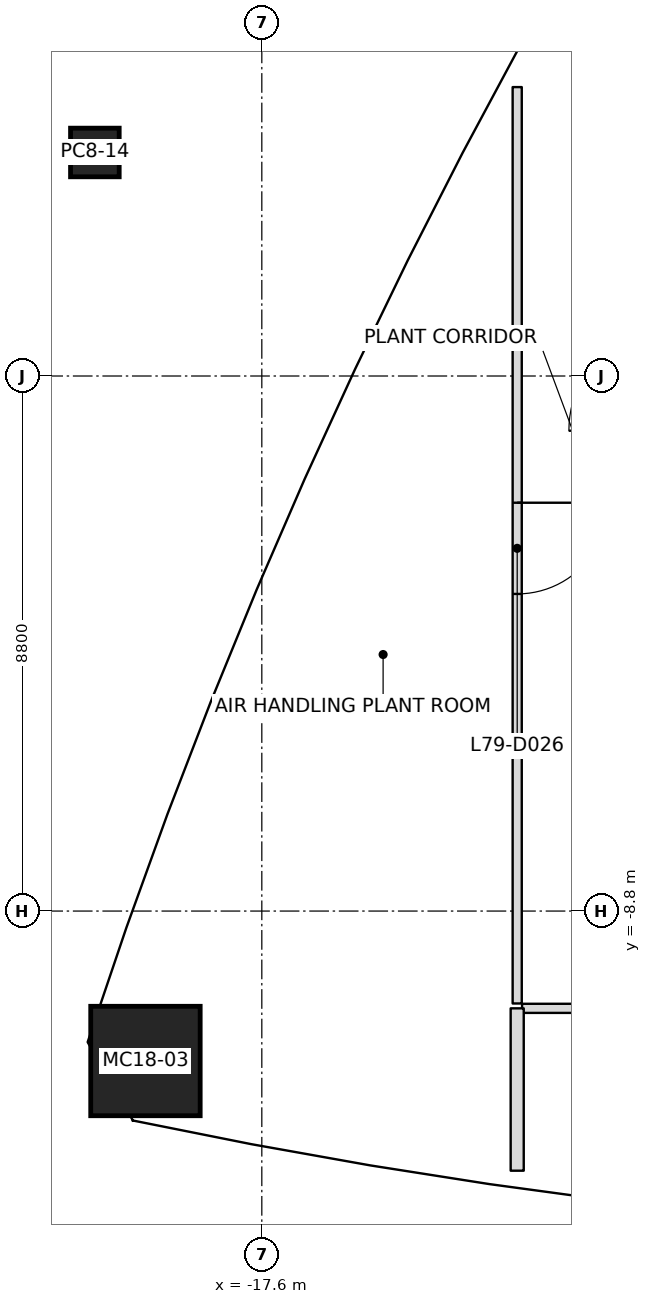
"""IFC4 building model, lengths in metres.
Left out: names, types, materials, properties, quantities, classifications, styles, units other than length and angle.
Written with IfcOpenShell. Run it as: python <this file> out.ifc"""

import sys

from ifc_helpers import new_model, si_unit, direction, frame, frame_2d, origin, origin_2d, place, context, subcontext, project, spatial, rectangle, extrude, element, fill, save


model = new_model("IFC4")
c1 = context("Model", 3, precision=1e-05, world=origin(), true_north=direction((0.0, 1.0)))
c2 = subcontext(c1, "Body", "Model", "MODEL_VIEW")
j1 = project(units=[si_unit("LENGTHUNIT", "METRE"), si_unit("PLANEANGLEUNIT", "RADIAN")], contexts=[c1])
p1 = place(None, origin())
s1 = spatial("IfcSite", under=j1, at=p1, CompositionType="ELEMENT")
p2 = place(p1, origin())
s2 = spatial("IfcBuilding", under=s1, at=p2, CompositionType="ELEMENT")
p3 = place(p2, frame((0.0, 0.0, 355.6)))
s3 = spatial("IfcBuildingStorey", under=s2, at=p3, CompositionType="ELEMENT", Elevation=355.6)
p4 = place(p3, frame((-19.514, -11.266, 0.0), z_axis=(0.0, 0.0, 1.0), x_axis=(1.0, 0.0, 0.0)))
e1 = element("IfcColumn", 1, at=p4, inside=s3, PredefinedType="COLUMN", context=c2, shape_type="SweptSolid", body=[
    extrude(rectangle(XDim=1.8, YDim=1.8, at=origin_2d()), origin(), (0.0, 0.0, 1.0), 5.4),
])
p5 = place(p3, frame((-20.346, 3.676, 0.0), z_axis=(0.0, 0.0, 1.0), x_axis=(0.438895015251, 0.898538349537, 0.0)))
e2 = element("IfcColumn", 2, at=p5, inside=s3, PredefinedType="COLUMN", context=c2, shape_type="SweptSolid", body=[
    extrude(rectangle(XDim=0.8, YDim=0.8, at=origin_2d()), origin(), (0.0, 0.0, 1.0), 5.4),
])
p6 = place(p3, frame((-13.4, -10.4, 0.0), z_axis=(0.0, 0.0, 1.0), x_axis=(0.0, -1.0, 0.0)))
e3 = element("IfcWall", 3, at=p6, inside=s3, PredefinedType="PARTITIONING", context=c2, shape_type="SweptSolid", body=[
    extrude(rectangle(XDim=2.67, YDim=0.215, at=frame_2d((1.335, 0.0))), origin(), (0.0, 0.0, 1.0), 4.85),
])
p7 = place(p3, frame((-13.4, 4.752, 0.0), z_axis=(0.0, 0.0, 1.0), x_axis=(0.0, -1.0, 0.0)))
e4 = element("IfcWall", 4, at=p7, inside=s3, PredefinedType="PARTITIONING", context=c2, shape_type="SweptSolid", body=[
    extrude(rectangle(XDim=15.072, YDim=0.15, at=frame_2d((7.536, 0.0))), origin(), (0.0, 0.0, 1.0), 4.497),
])
p8 = place(p7, frame((6.836, 0.0, 0.0)))
e5 = element("IfcOpeningElement", 5, at=p8, cuts=e4, PredefinedType="OPENING", context=c2, shape_type="SweptSolid", body=[
    extrude(rectangle(XDim=1.5, YDim=2.4, at=frame_2d((0.75, 1.2))), frame((0.0, 0.075, 0.0), z_axis=(0.0, -1.0, 0.0), x_axis=(1.0, 0.0, 0.0)), (0.0, 0.0, 1.0), 0.15),
])
p9 = place(p3, frame((-13.32, -10.4, 0.0), z_axis=(0.0, 0.0, 1.0), x_axis=(1.0, 0.0, 0.0)))
e6 = element("IfcWall", 6, at=p9, inside=s3, PredefinedType="PARTITIONING", context=c2, shape_type="SweptSolid", body=[
    extrude(rectangle(XDim=26.64, YDim=0.15, at=frame_2d((13.32, 0.0))), origin(), (0.0, 0.0, 1.0), 4.643),
])
p10 = place(p9, frame((5.32, 0.0, 0.0)))
e7 = element("IfcOpeningElement", 7, at=p10, cuts=e6, PredefinedType="OPENING", context=c2, shape_type="SweptSolid", body=[
    extrude(rectangle(XDim=1.0, YDim=2.4, at=frame_2d((0.5, 1.2))), frame((0.0, 0.075, 0.0), z_axis=(0.0, -1.0, 0.0), x_axis=(1.0, 0.0, 0.0)), (0.0, 0.0, 1.0), 0.15),
])
p11 = place(p9, frame((18.72, 0.0, 0.0)))
e8 = element("IfcOpeningElement", 8, at=p11, cuts=e6, PredefinedType="OPENING", context=c2, shape_type="SweptSolid", body=[
    extrude(rectangle(XDim=1.0, YDim=2.4, at=frame_2d((0.5, 1.2))), frame((0.0, 0.075, 0.0), z_axis=(0.0, -1.0, 0.0), x_axis=(1.0, 0.0, 0.0)), (0.0, 0.0, 1.0), 0.15),
])
p12 = place(p8, origin())
e9 = element("IfcDoor", 9, at=p12, inside=s3, OperationType="DOUBLE_DOOR_SINGLE_SWING", PredefinedType="DOOR", context=c2, shape_type="SweptSolid", body=[
    extrude(rectangle(XDim=1.5, YDim=2.4, at=frame_2d((0.75, 1.2))), frame((0.0, 0.025, 0.0), z_axis=(0.0, -1.0, 0.0), x_axis=(1.0, 0.0, 0.0)), (0.0, 0.0, 1.0), 0.05),
])
fill(e5, e9)
save(model, sys.argv[1])
